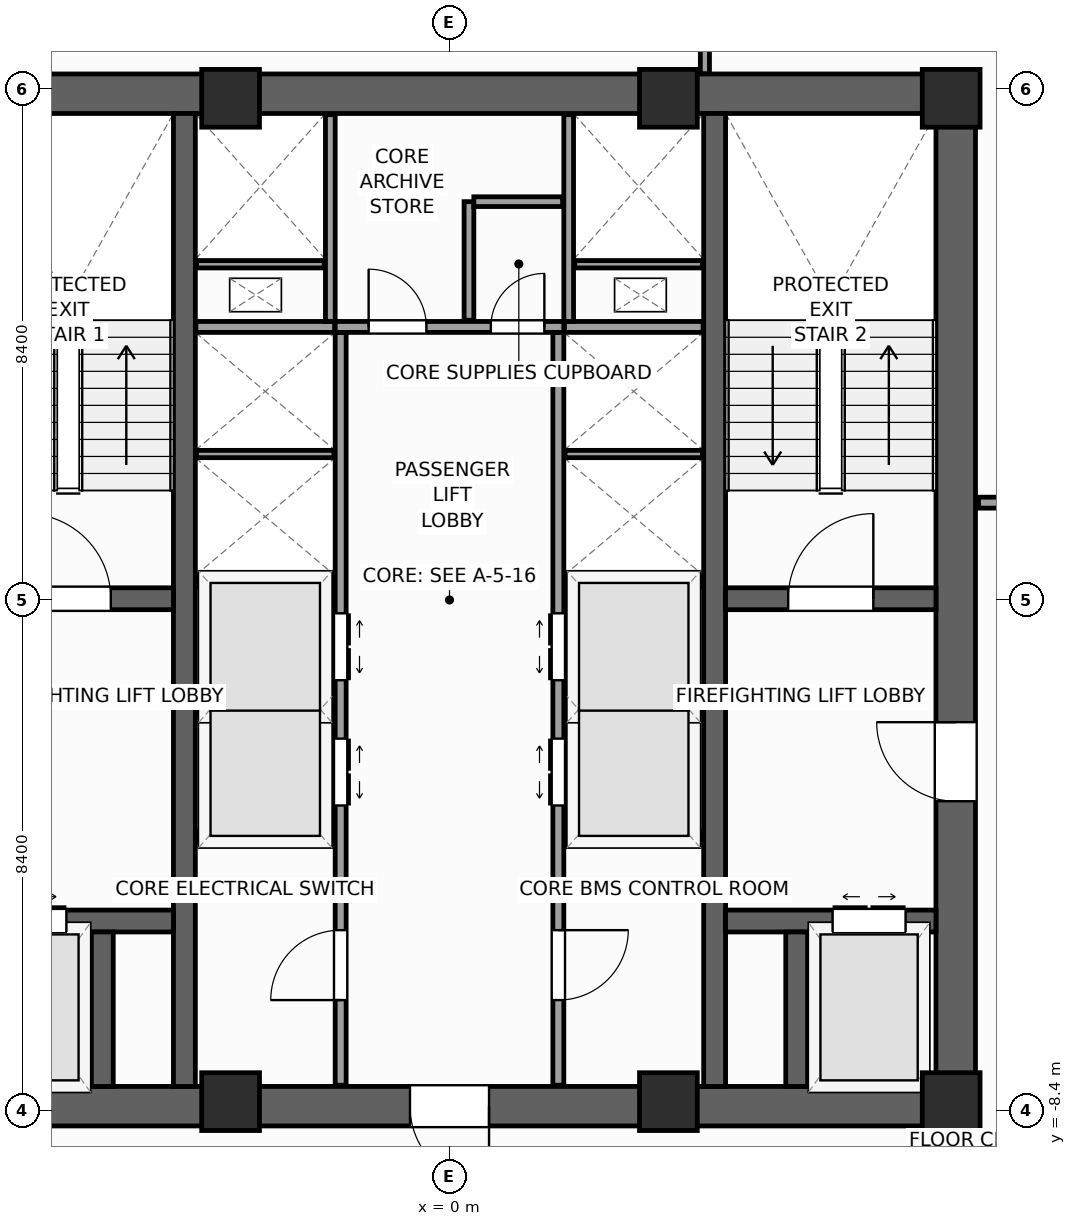
"""IFC4 building model, lengths in metres.
Left out: names, types, materials, properties, quantities, classifications, styles, units other than length and angle.
Written with IfcOpenShell. Run it as: python <this file> out.ifc"""

import sys

from ifc_helpers import new_model, si_unit, direction, frame, frame_2d, origin, origin_2d, place, context, subcontext, project, spatial, rectangle, extrude, source, transform, mapped, element, fill, save


model = new_model("IFC4")
c1 = context("Model", 3, precision=1e-05, world=origin(), true_north=direction((0.0, 1.0)))
c2 = subcontext(c1, "Body", "Model", "MODEL_VIEW")
j1 = project(units=[si_unit("LENGTHUNIT", "METRE"), si_unit("PLANEANGLEUNIT", "RADIAN")], contexts=[c1])
p1 = place(None, origin())
s1 = spatial("IfcSite", under=j1, at=p1, CompositionType="ELEMENT")
p2 = place(p1, origin())
s2 = spatial("IfcBuilding", under=s1, at=p2, CompositionType="ELEMENT")
p3 = place(p2, frame((0.0, 0.0, 172.4)))
s3 = spatial("IfcBuildingStorey", under=s2, at=p3, CompositionType="ELEMENT", Elevation=172.4)
p4 = place(p3, frame((-8.65, -8.325, 0.0), z_axis=(0.0, 0.0, 1.0), x_axis=(1.0, 0.0, 0.0)))
e1 = element("IfcWall", 1, at=p4, inside=s3, PredefinedType="SHEAR", context=c2, shape_type="SweptSolid", body=[
    extrude(rectangle(XDim=17.3, YDim=0.65, at=frame_2d((8.65, 0.0))), origin(), (0.0, 0.0, 1.0), 4.0),
])
p5 = place(p4, frame((8.0, 0.0, 0.0)))
e2 = element("IfcOpeningElement", 2, at=p5, cuts=e1, PredefinedType="OPENING", context=c2, shape_type="SweptSolid", body=[
    extrude(rectangle(XDim=1.3, YDim=2.2, at=frame_2d((0.65, 1.1))), frame((0.0, 0.335, 0.0), z_axis=(0.0, -1.0, 0.0), x_axis=(1.0, 0.0, 0.0)), (0.0, 0.0, 1.0), 0.67),
])
p6 = place(p3, frame((-8.65, 8.325, 0.0), z_axis=(0.0, 0.0, 1.0), x_axis=(1.0, 0.0, 0.0)))
e3 = element("IfcWall", 3, at=p6, inside=s3, PredefinedType="SHEAR", context=c2, shape_type="SweptSolid", body=[
    extrude(rectangle(XDim=17.3, YDim=0.65, at=frame_2d((8.65, 0.0))), origin(), (0.0, 0.0, 1.0), 4.0),
])
p7 = place(p3, frame((8.325, -8.0, 0.0), z_axis=(0.0, 0.0, 1.0), x_axis=(0.0, 1.0, 0.0)))
e4 = element("IfcWall", 4, at=p7, inside=s3, PredefinedType="SHEAR", context=c2, shape_type="SweptSolid", body=[
    extrude(rectangle(XDim=16.0, YDim=0.65, at=frame_2d((8.0, 0.0))), origin(), (0.0, 0.0, 1.0), 4.0),
])
p8 = place(p7, frame((4.69, 0.0, 0.0)))
e5 = element("IfcOpeningElement", 5, at=p8, cuts=e4, PredefinedType="OPENING", context=c2, shape_type="SweptSolid", body=[
    extrude(rectangle(XDim=1.3, YDim=2.2, at=frame_2d((0.65, 1.1))), frame((0.0, 0.335, 0.0), z_axis=(0.0, -1.0, 0.0), x_axis=(1.0, 0.0, 0.0)), (0.0, 0.0, 1.0), 0.67),
])
for number, where, z_axis, x_axis in (
    (6, (-4.36, -8.0, 0.0), (0.0, 0.0, 1.0), (0.0, 1.0, 0.0)),
    (7, (4.36, -8.0, 0.0), (0.0, 0.0, 1.0), (0.0, 1.0, 0.0)),
):
    element("IfcWall", number, at=place(p3, frame(where, z_axis=z_axis, x_axis=x_axis)), inside=s3, PredefinedType="SHEAR", context=c2, shape_type="SweptSolid", body=[
        extrude(rectangle(XDim=16.0, YDim=0.36, at=frame_2d((8.0, 0.0))), origin(), (0.0, 0.0, 1.0), 4.0),
    ])
p9 = place(p3, frame((-8.0, 0.02, 0.0), z_axis=(0.0, 0.0, 1.0), x_axis=(1.0, 0.0, 0.0)))
e8 = element("IfcWall", 8, at=p9, inside=s3, PredefinedType="SHEAR", context=c2, shape_type="SweptSolid", body=[
    extrude(rectangle(XDim=3.46, YDim=0.36, at=frame_2d((1.73, 0.0))), origin(), (0.0, 0.0, 1.0), 4.0),
])
p10 = place(p9, frame((1.03, 0.0, 0.0)))
e9 = element("IfcOpeningElement", 9, at=p10, cuts=e8, PredefinedType="OPENING", context=c2, shape_type="SweptSolid", body=[
    extrude(rectangle(XDim=1.4, YDim=2.2, at=frame_2d((0.7, 1.1))), frame((0.0, 0.19, 0.0), z_axis=(0.0, -1.0, 0.0), x_axis=(1.0, 0.0, 0.0)), (0.0, 0.0, 1.0), 0.38),
])
p11 = place(p3, frame((4.54, 0.02, 0.0), z_axis=(0.0, 0.0, 1.0), x_axis=(1.0, 0.0, 0.0)))
e10 = element("IfcWall", 10, at=p11, inside=s3, PredefinedType="SHEAR", context=c2, shape_type="SweptSolid", body=[
    extrude(rectangle(XDim=3.46, YDim=0.36, at=frame_2d((1.73, 0.0))), origin(), (0.0, 0.0, 1.0), 4.0),
])
p12 = place(p11, frame((1.03, 0.0, 0.0)))
e11 = element("IfcOpeningElement", 11, at=p12, cuts=e10, PredefinedType="OPENING", context=c2, shape_type="SweptSolid", body=[
    extrude(rectangle(XDim=1.4, YDim=2.2, at=frame_2d((0.7, 1.1))), frame((0.0, 0.19, 0.0), z_axis=(0.0, -1.0, 0.0), x_axis=(1.0, 0.0, 0.0)), (0.0, 0.0, 1.0), 0.38),
])
p13 = place(p3, frame((-8.0, -5.28, 0.0), z_axis=(0.0, 0.0, 1.0), x_axis=(1.0, 0.0, 0.0)))
e12 = element("IfcWall", 12, at=p13, inside=s3, PredefinedType="SHEAR", context=c2, shape_type="SweptSolid", body=[
    extrude(rectangle(XDim=3.46, YDim=0.36, at=frame_2d((1.73, 0.0))), origin(), (0.0, 0.0, 1.0), 4.0),
])
p14 = place(p13, frame((0.5, 0.0, 0.0)))
e13 = element("IfcOpeningElement", 13, at=p14, cuts=e12, PredefinedType="OPENING", context=c2, shape_type="SweptSolid", body=[
    extrude(rectangle(XDim=1.2, YDim=2.25, at=frame_2d((0.6, 1.125))), frame((0.0, 0.19, 0.0), z_axis=(0.0, -1.0, 0.0), x_axis=(1.0, 0.0, 0.0)), (0.0, 0.0, 1.0), 0.38),
])
p15 = place(p3, frame((4.54, -5.28, 0.0), z_axis=(0.0, 0.0, 1.0), x_axis=(1.0, 0.0, 0.0)))
e14 = element("IfcWall", 14, at=p15, inside=s3, PredefinedType="SHEAR", context=c2, shape_type="SweptSolid", body=[
    extrude(rectangle(XDim=3.46, YDim=0.36, at=frame_2d((1.73, 0.0))), origin(), (0.0, 0.0, 1.0), 4.0),
])
p16 = place(p15, frame((1.76, 0.0, 0.0)))
e15 = element("IfcOpeningElement", 15, at=p16, cuts=e14, PredefinedType="OPENING", context=c2, shape_type="SweptSolid", body=[
    extrude(rectangle(XDim=1.2, YDim=2.25, at=frame_2d((0.6, 1.125))), frame((0.0, 0.19, 0.0), z_axis=(0.0, -1.0, 0.0), x_axis=(1.0, 0.0, 0.0)), (0.0, 0.0, 1.0), 0.38),
])
for number, where, z_axis, x_axis in (
    (16, (-5.71, -8.0, 0.0), (0.0, 0.0, 1.0), (0.0, 1.0, 0.0)),
    (17, (5.71, -8.0, 0.0), (0.0, 0.0, 1.0), (0.0, 1.0, 0.0)),
):
    element("IfcWall", number, at=place(p3, frame(where, z_axis=z_axis, x_axis=x_axis)), inside=s3, PredefinedType="SHEAR", context=c2, shape_type="SweptSolid", body=[
        extrude(rectangle(XDim=2.54, YDim=0.36, at=frame_2d((1.27, 0.0))), origin(), (0.0, 0.0, 1.0), 4.0),
    ])
m1 = source(origin(), c2, "Body", "SweptSolid", [
    extrude(rectangle(XDim=0.95, YDim=0.95, at=origin_2d()), origin(), (0.0, 0.0, 1.0), 4.0),
])
for number, where, z_axis, x_axis in (
    (18, (8.25, -8.25, 0.0), (0.0, 0.0, 1.0), (1.0, 0.0, 0.0)),
    (19, (8.25, 8.25, 0.0), (0.0, 0.0, 1.0), (1.0, 0.0, 0.0)),
    (20, (-3.6, -8.25, 0.0), (0.0, 0.0, 1.0), (1.0, 0.0, 0.0)),
    (21, (3.6, -8.25, 0.0), (0.0, 0.0, 1.0), (1.0, 0.0, 0.0)),
    (22, (-3.6, 8.25, 0.0), (0.0, 0.0, 1.0), (1.0, 0.0, 0.0)),
    (23, (3.6, 8.25, 0.0), (0.0, 0.0, 1.0), (1.0, 0.0, 0.0)),
):
    element("IfcColumn", number, at=place(p3, frame(where, z_axis=z_axis, x_axis=x_axis)), inside=s3, PredefinedType="PILASTER", context=c2, shape_type="MappedRepresentation", body=[
        mapped(m1, transform((0.0, 0.0, 0.0), scale=1.0)),
    ])
p17 = place(p3, frame((-1.79, -7.98, 0.0), z_axis=(0.0, 0.0, 1.0), x_axis=(0.0, 1.0, 0.0)))
e24 = element("IfcWall", 24, at=p17, inside=s3, PredefinedType="PARTITIONING", context=c2, shape_type="SweptSolid", body=[
    extrude(rectangle(XDim=12.38, YDim=0.18, at=frame_2d((6.19, 0.0))), origin(), (0.0, 0.0, 1.0), 3.74),
])
p18 = place(p17, frame((4.6, 0.0, 0.0)))
e25 = element("IfcOpeningElement", 25, at=p18, cuts=e24, PredefinedType="OPENING", context=c2, shape_type="SweptSolid", body=[
    extrude(rectangle(XDim=1.1, YDim=2.2, at=frame_2d((0.55, 1.1))), frame((0.0, 0.1, 0.0), z_axis=(0.0, -1.0, 0.0), x_axis=(1.0, 0.0, 0.0)), (0.0, 0.0, 1.0), 0.2),
])
p19 = place(p17, frame((6.66, 0.0, 0.0)))
e26 = element("IfcOpeningElement", 26, at=p19, cuts=e24, PredefinedType="OPENING", context=c2, shape_type="SweptSolid", body=[
    extrude(rectangle(XDim=1.1, YDim=2.2, at=frame_2d((0.55, 1.1))), frame((0.0, 0.1, 0.0), z_axis=(0.0, -1.0, 0.0), x_axis=(1.0, 0.0, 0.0)), (0.0, 0.0, 1.0), 0.2),
])
p20 = place(p17, frame((1.4, 0.0, 0.0)))
e27 = element("IfcOpeningElement", 27, at=p20, cuts=e24, PredefinedType="OPENING", context=c2, shape_type="SweptSolid", body=[
    extrude(rectangle(XDim=1.15, YDim=2.25, at=frame_2d((0.575, 1.125))), frame((0.0, 0.1, 0.0), z_axis=(0.0, -1.0, 0.0), x_axis=(1.0, 0.0, 0.0)), (0.0, 0.0, 1.0), 0.2),
])
p21 = place(p3, frame((1.79, -7.98, 0.0), z_axis=(0.0, 0.0, 1.0), x_axis=(0.0, 1.0, 0.0)))
e28 = element("IfcWall", 28, at=p21, inside=s3, PredefinedType="PARTITIONING", context=c2, shape_type="SweptSolid", body=[
    extrude(rectangle(XDim=12.38, YDim=0.18, at=frame_2d((6.19, 0.0))), origin(), (0.0, 0.0, 1.0), 3.74),
])
p22 = place(p21, frame((4.6, 0.0, 0.0)))
e29 = element("IfcOpeningElement", 29, at=p22, cuts=e28, PredefinedType="OPENING", context=c2, shape_type="SweptSolid", body=[
    extrude(rectangle(XDim=1.1, YDim=2.2, at=frame_2d((0.55, 1.1))), frame((0.0, 0.1, 0.0), z_axis=(0.0, -1.0, 0.0), x_axis=(1.0, 0.0, 0.0)), (0.0, 0.0, 1.0), 0.2),
])
p23 = place(p21, frame((6.66, 0.0, 0.0)))
e30 = element("IfcOpeningElement", 30, at=p23, cuts=e28, PredefinedType="OPENING", context=c2, shape_type="SweptSolid", body=[
    extrude(rectangle(XDim=1.1, YDim=2.2, at=frame_2d((0.55, 1.1))), frame((0.0, 0.1, 0.0), z_axis=(0.0, -1.0, 0.0), x_axis=(1.0, 0.0, 0.0)), (0.0, 0.0, 1.0), 0.2),
])
p24 = place(p21, frame((1.4, 0.0, 0.0)))
e31 = element("IfcOpeningElement", 31, at=p24, cuts=e28, PredefinedType="OPENING", context=c2, shape_type="SweptSolid", body=[
    extrude(rectangle(XDim=1.15, YDim=2.25, at=frame_2d((0.575, 1.125))), frame((0.0, 0.1, 0.0), z_axis=(0.0, -1.0, 0.0), x_axis=(1.0, 0.0, 0.0)), (0.0, 0.0, 1.0), 0.2),
])
p25 = place(p3, frame((-1.88, 4.49, 0.0), z_axis=(0.0, 0.0, 1.0), x_axis=(1.0, 0.0, 0.0)))
e32 = element("IfcWall", 32, at=p25, inside=s3, PredefinedType="PARTITIONING", context=c2, shape_type="SweptSolid", body=[
    extrude(rectangle(XDim=3.76, YDim=0.18, at=frame_2d((1.88, 0.0))), origin(), (0.0, 0.0, 1.0), 3.74),
])
p26 = place(p25, frame((0.55, 0.0, 0.0)))
e33 = element("IfcOpeningElement", 33, at=p26, cuts=e32, PredefinedType="OPENING", context=c2, shape_type="SweptSolid", body=[
    extrude(rectangle(XDim=0.95, YDim=2.1, at=frame_2d((0.475, 1.05))), frame((0.0, 0.1, 0.0), z_axis=(0.0, -1.0, 0.0), x_axis=(1.0, 0.0, 0.0)), (0.0, 0.0, 1.0), 0.2),
])
p27 = place(p25, frame((2.56, 0.0, 0.0)))
e34 = element("IfcOpeningElement", 34, at=p27, cuts=e32, PredefinedType="OPENING", context=c2, shape_type="SweptSolid", body=[
    extrude(rectangle(XDim=0.88, YDim=2.1, at=frame_2d((0.44, 1.05))), frame((0.0, 0.1, 0.0), z_axis=(0.0, -1.0, 0.0), x_axis=(1.0, 0.0, 0.0)), (0.0, 0.0, 1.0), 0.2),
])
for number, where, z_axis, x_axis in (
    (35, (-4.17, -3.9, 0.0), (0.0, 0.0, 1.0), (1.0, 0.0, 0.0)),
    (36, (1.89, -3.9, 0.0), (0.0, 0.0, 1.0), (1.0, 0.0, 0.0)),
    (37, (-4.17, 0.3, 0.0), (0.0, 0.0, 1.0), (1.0, 0.0, 0.0)),
    (38, (1.89, 0.3, 0.0), (0.0, 0.0, 1.0), (1.0, 0.0, 0.0)),
    (39, (-4.17, 4.49, 0.0), (0.0, 0.0, 1.0), (1.0, 0.0, 0.0)),
    (40, (1.89, 4.49, 0.0), (0.0, 0.0, 1.0), (1.0, 0.0, 0.0)),
):
    element("IfcWall", number, at=place(p3, frame(where, z_axis=z_axis, x_axis=x_axis)), inside=s3, PredefinedType="PARTITIONING", context=c2, shape_type="SweptSolid", body=[
        extrude(rectangle(XDim=2.28, YDim=0.18, at=frame_2d((1.14, 0.0))), origin(), (0.0, 0.0, 1.0), 3.74),
    ])
for number, where, z_axis, x_axis in (
    (41, (-4.16, -1.8, 0.0), (0.0, 0.0, 1.0), (1.0, 0.0, 0.0)),
    (42, (1.9, -1.8, 0.0), (0.0, 0.0, 1.0), (1.0, 0.0, 0.0)),
    (43, (-4.16, 2.4, 0.0), (0.0, 0.0, 1.0), (1.0, 0.0, 0.0)),
    (44, (1.9, 2.4, 0.0), (0.0, 0.0, 1.0), (1.0, 0.0, 0.0)),
):
    element("IfcWall", number, at=place(p3, frame(where, z_axis=z_axis, x_axis=x_axis)), inside=s3, PredefinedType="PARTITIONING", context=c2, shape_type="SweptSolid", body=[
        extrude(rectangle(XDim=2.26, YDim=0.12, at=frame_2d((1.13, 0.0))), origin(), (0.0, 0.0, 1.0), 3.74),
    ])
for number, where, z_axis, x_axis in (
    (45, (-1.96, 4.58, 0.0), (0.0, 0.0, 1.0), (0.0, 1.0, 0.0)),
    (46, (1.96, 4.58, 0.0), (0.0, 0.0, 1.0), (0.0, 1.0, 0.0)),
):
    element("IfcWall", number, at=place(p3, frame(where, z_axis=z_axis, x_axis=x_axis)), inside=s3, PredefinedType="PARTITIONING", context=c2, shape_type="SweptSolid", body=[
        extrude(rectangle(XDim=3.4, YDim=0.16, at=frame_2d((1.7, 0.0))), origin(), (0.0, 0.0, 1.0), 3.74),
    ])
for number, where, z_axis, x_axis in (
    (47, (-4.16, 5.52, 0.0), (0.0, 0.0, 1.0), (1.0, 0.0, 0.0)),
    (48, (2.06, 5.52, 0.0), (0.0, 0.0, 1.0), (1.0, 0.0, 0.0)),
):
    element("IfcWall", number, at=place(p3, frame(where, z_axis=z_axis, x_axis=x_axis)), inside=s3, PredefinedType="PARTITIONING", context=c2, shape_type="SweptSolid", body=[
        extrude(rectangle(XDim=2.1, YDim=0.12, at=frame_2d((1.05, 0.0))), origin(), (0.0, 0.0, 1.0), 3.74),
    ])
p28 = place(p3, frame((0.32, 4.6, 0.0), z_axis=(0.0, 0.0, 1.0), x_axis=(0.0, 1.0, 0.0)))
e49 = element("IfcWall", 49, at=p28, inside=s3, PredefinedType="PARTITIONING", context=c2, shape_type="SweptSolid", body=[
    extrude(rectangle(XDim=1.95, YDim=0.16, at=frame_2d((0.975, 0.0))), origin(), (0.0, 0.0, 1.0), 3.74),
])
p29 = place(p3, frame((0.4, 6.55, 0.0), z_axis=(0.0, 0.0, 1.0), x_axis=(1.0, 0.0, 0.0)))
e50 = element("IfcWall", 50, at=p29, inside=s3, PredefinedType="PARTITIONING", context=c2, shape_type="SweptSolid", body=[
    extrude(rectangle(XDim=1.46, YDim=0.16, at=frame_2d((0.73, 0.0))), origin(), (0.0, 0.0, 1.0), 3.74),
])
p30 = place(p3, frame((8.7, 1.6, 0.0), z_axis=(0.0, 0.0, 1.0), x_axis=(1.0, 0.0, 0.0)))
e51 = element("IfcWall", 51, at=p30, inside=s3, PredefinedType="PARTITIONING", context=c2, shape_type="SweptSolid", body=[
    extrude(rectangle(XDim=2.9, YDim=0.18, at=frame_2d((1.45, 0.0))), origin(), (0.0, 0.0, 1.0), 3.74),
])
p31 = place(p30, frame((0.9, 0.0, 0.0)))
e52 = element("IfcOpeningElement", 52, at=p31, cuts=e51, PredefinedType="OPENING", context=c2, shape_type="SweptSolid", body=[
    extrude(rectangle(XDim=1.1, YDim=2.2, at=frame_2d((0.55, 1.1))), frame((0.0, 0.1, 0.0), z_axis=(0.0, -1.0, 0.0), x_axis=(1.0, 0.0, 0.0)), (0.0, 0.0, 1.0), 0.2),
])
p32 = place(p3, frame((4.2, 8.655, 0.0), z_axis=(0.0, 0.0, 1.0), x_axis=(0.0, 1.0, 0.0)))
e53 = element("IfcWall", 53, at=p32, inside=s3, PredefinedType="PARTITIONING", context=c2, shape_type="SweptSolid", body=[
    extrude(rectangle(XDim=21.286, YDim=0.15, at=frame_2d((10.643, 0.0))), origin(), (0.0, 0.0, 1.0), 3.74),
])
m2 = source(origin(), c2, "Body", "SweptSolid", [
    extrude(rectangle(XDim=1.4, YDim=2.2, at=frame_2d((0.7, 1.1))), frame((0.0, 0.025, 0.0), z_axis=(0.0, -1.0, 0.0), x_axis=(1.0, 0.0, 0.0)), (0.0, 0.0, 1.0), 0.05),
])
p33 = place(p10, origin())
e54 = element("IfcDoor", 54, at=p33, inside=s3, OperationType="SINGLE_SWING_LEFT", PredefinedType="DOOR", context=c2, shape_type="MappedRepresentation", body=[
    mapped(m2, transform((0.0, 0.0, 0.0), scale=1.0)),
])
fill(e9, e54)
p34 = place(p12, origin())
e55 = element("IfcDoor", 55, at=p34, inside=s3, OperationType="SINGLE_SWING_RIGHT", PredefinedType="DOOR", context=c2, shape_type="MappedRepresentation", body=[
    mapped(m2, transform((0.0, 0.0, 0.0), scale=1.0)),
])
fill(e11, e55)
m3 = source(origin(), c2, "Body", "SweptSolid", [
    extrude(rectangle(XDim=1.3, YDim=2.2, at=frame_2d((0.65, 1.1))), frame((0.0, 0.025, 0.0), z_axis=(0.0, -1.0, 0.0), x_axis=(1.0, 0.0, 0.0)), (0.0, 0.0, 1.0), 0.05),
])
p35 = place(p8, origin())
e56 = element("IfcDoor", 56, at=p35, inside=s3, OperationType="SINGLE_SWING_RIGHT", PredefinedType="DOOR", context=c2, shape_type="MappedRepresentation", body=[
    mapped(m3, transform((0.0, 0.0, 0.0), scale=1.0)),
])
fill(e5, e56)
p36 = place(p5, frame((1.3, 0.0, 0.0), z_axis=(0.0, 0.0, 1.0), x_axis=(-1.0, 0.0, 0.0)))
e57 = element("IfcDoor", 57, at=p36, inside=s3, OperationType="SINGLE_SWING_RIGHT", PredefinedType="DOOR", context=c2, shape_type="MappedRepresentation", body=[
    mapped(m3, transform((0.0, 0.0, 0.0), scale=1.0)),
])
fill(e2, e57)
m4 = source(origin(), c2, "Body", "SweptSolid", [
    extrude(rectangle(XDim=1.2, YDim=2.25, at=frame_2d((0.6, 1.125))), frame((0.0, 0.025, 0.0), z_axis=(0.0, -1.0, 0.0), x_axis=(1.0, 0.0, 0.0)), (0.0, 0.0, 1.0), 0.05),
])
p37 = place(p14, origin())
e58 = element("IfcDoor", 58, at=p37, inside=s3, OperationType="DOUBLE_DOOR_SLIDING", PredefinedType="DOOR", context=c2, shape_type="MappedRepresentation", body=[
    mapped(m4, transform((0.0, 0.0, 0.0), scale=1.0)),
])
fill(e13, e58)
p38 = place(p16, origin())
e59 = element("IfcDoor", 59, at=p38, inside=s3, OperationType="DOUBLE_DOOR_SLIDING", PredefinedType="DOOR", context=c2, shape_type="MappedRepresentation", body=[
    mapped(m4, transform((0.0, 0.0, 0.0), scale=1.0)),
])
fill(e15, e59)
m5 = source(origin(), c2, "Body", "SweptSolid", [
    extrude(rectangle(XDim=1.1, YDim=2.2, at=frame_2d((0.55, 1.1))), frame((0.0, 0.025, 0.0), z_axis=(0.0, -1.0, 0.0), x_axis=(1.0, 0.0, 0.0)), (0.0, 0.0, 1.0), 0.05),
])
p39 = place(p18, frame((1.1, 0.0, 0.0), z_axis=(0.0, 0.0, 1.0), x_axis=(-1.0, 0.0, 0.0)))
e60 = element("IfcDoor", 60, at=p39, inside=s3, OperationType="DOUBLE_DOOR_SLIDING", PredefinedType="DOOR", context=c2, shape_type="MappedRepresentation", body=[
    mapped(m5, transform((0.0, 0.0, 0.0), scale=1.0)),
])
fill(e25, e60)
p40 = place(p19, frame((1.1, 0.0, 0.0), z_axis=(0.0, 0.0, 1.0), x_axis=(-1.0, 0.0, 0.0)))
e61 = element("IfcDoor", 61, at=p40, inside=s3, OperationType="DOUBLE_DOOR_SLIDING", PredefinedType="DOOR", context=c2, shape_type="MappedRepresentation", body=[
    mapped(m5, transform((0.0, 0.0, 0.0), scale=1.0)),
])
fill(e26, e61)
p41 = place(p22, origin())
e62 = element("IfcDoor", 62, at=p41, inside=s3, OperationType="DOUBLE_DOOR_SLIDING", PredefinedType="DOOR", context=c2, shape_type="MappedRepresentation", body=[
    mapped(m5, transform((0.0, 0.0, 0.0), scale=1.0)),
])
fill(e29, e62)
p42 = place(p23, origin())
e63 = element("IfcDoor", 63, at=p42, inside=s3, OperationType="DOUBLE_DOOR_SLIDING", PredefinedType="DOOR", context=c2, shape_type="MappedRepresentation", body=[
    mapped(m5, transform((0.0, 0.0, 0.0), scale=1.0)),
])
fill(e30, e63)
m6 = source(origin(), c2, "Body", "SweptSolid", [
    extrude(rectangle(XDim=1.15, YDim=2.25, at=frame_2d((0.575, 1.125))), frame((0.0, 0.025, 0.0), z_axis=(0.0, -1.0, 0.0), x_axis=(1.0, 0.0, 0.0)), (0.0, 0.0, 1.0), 0.05),
])
p43 = place(p20, origin())
e64 = element("IfcDoor", 64, at=p43, inside=s3, OperationType="SINGLE_SWING_LEFT", PredefinedType="DOOR", context=c2, shape_type="MappedRepresentation", body=[
    mapped(m6, transform((0.0, 0.0, 0.0), scale=1.0)),
])
fill(e27, e64)
p44 = place(p24, frame((1.15, 0.0, 0.0), z_axis=(0.0, 0.0, 1.0), x_axis=(-1.0, 0.0, 0.0)))
e65 = element("IfcDoor", 65, at=p44, inside=s3, OperationType="SINGLE_SWING_RIGHT", PredefinedType="DOOR", context=c2, shape_type="MappedRepresentation", body=[
    mapped(m6, transform((0.0, 0.0, 0.0), scale=1.0)),
])
fill(e31, e65)
m7 = source(origin(), c2, "Body", "SweptSolid", [
    extrude(rectangle(XDim=0.95, YDim=2.1, at=frame_2d((0.475, 1.05))), frame((0.0, 0.025, 0.0), z_axis=(0.0, -1.0, 0.0), x_axis=(1.0, 0.0, 0.0)), (0.0, 0.0, 1.0), 0.05),
])
p45 = place(p26, origin())
e66 = element("IfcDoor", 66, at=p45, inside=s3, OperationType="SINGLE_SWING_LEFT", PredefinedType="DOOR", context=c2, shape_type="MappedRepresentation", body=[
    mapped(m7, transform((0.0, 0.0, 0.0), scale=1.0)),
])
fill(e33, e66)
m8 = source(origin(), c2, "Body", "SweptSolid", [
    extrude(rectangle(XDim=0.88, YDim=2.1, at=frame_2d((0.44, 1.05))), frame((0.0, 0.025, 0.0), z_axis=(0.0, -1.0, 0.0), x_axis=(1.0, 0.0, 0.0)), (0.0, 0.0, 1.0), 0.05),
])
p46 = place(p27, origin())
e67 = element("IfcDoor", 67, at=p46, inside=s3, OperationType="SINGLE_SWING_RIGHT", PredefinedType="DOOR", context=c2, shape_type="MappedRepresentation", body=[
    mapped(m8, transform((0.0, 0.0, 0.0), scale=1.0)),
])
fill(e34, e67)
save(model, sys.argv[1])
